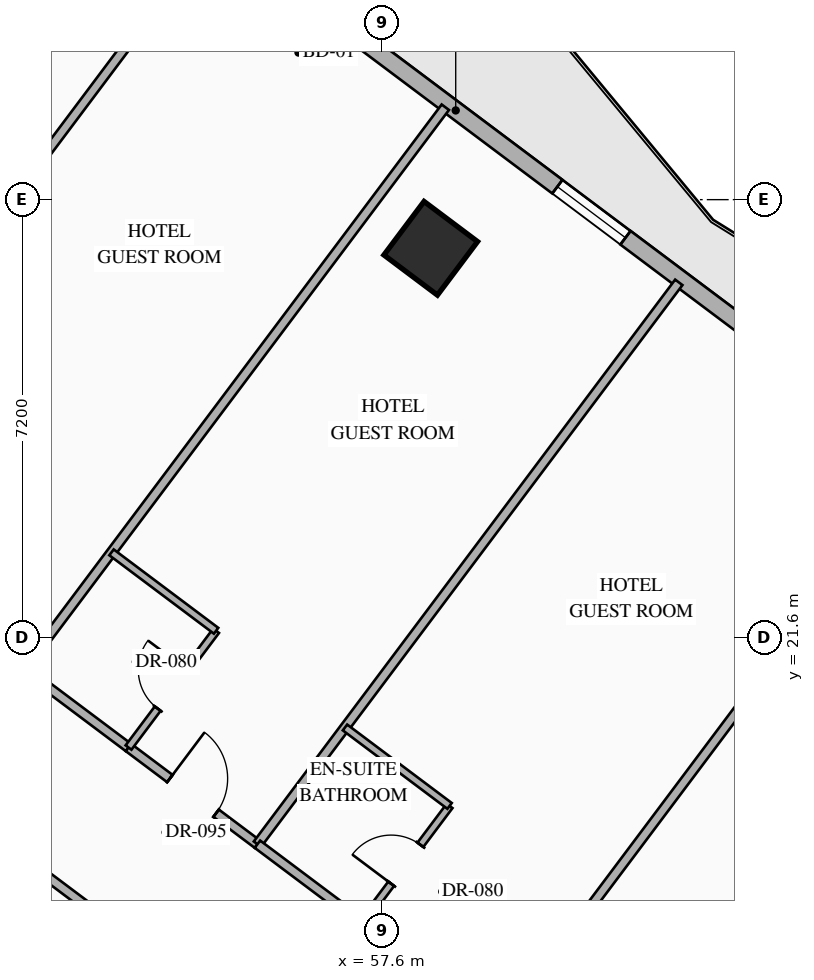
"""IFC4 building model, lengths in metres.
Left out: names, types, materials, properties, quantities, classifications, styles, units other than length and angle.
Written with IfcOpenShell. Run it as: python <this file> out.ifc"""

import sys

from ifc_helpers import new_model, si_unit, direction, frame, frame_2d, origin, origin_2d, place, context, subcontext, project, spatial, rectangle, hollow_rectangle, extrude, element, fill, save


model = new_model("IFC4")
c1 = context("Model", 3, precision=1e-05, world=origin(), true_north=direction((0.0, 1.0)))
c2 = subcontext(c1, "Body", "Model", "MODEL_VIEW")
j1 = project(units=[si_unit("LENGTHUNIT", "METRE"), si_unit("PLANEANGLEUNIT", "RADIAN")], contexts=[c1])
p1 = place(None, origin())
s1 = spatial("IfcSite", under=j1, at=p1, CompositionType="ELEMENT")
p2 = place(p1, origin())
s2 = spatial("IfcBuilding", under=s1, at=p2, CompositionType="ELEMENT")
p3 = place(p2, frame((0.0, 0.0, 56.7)))
s3 = spatial("IfcBuildingStorey", under=s2, at=p3, CompositionType="ELEMENT", Elevation=56.7)
p4 = place(p3, frame((58.4, 28.0, 0.0), z_axis=(0.0, 0.0, 1.0), x_axis=(0.799999996291, -0.600000004945, 0.0)))
e1 = element("IfcColumn", 1, at=p4, inside=s3, PredefinedType="COLUMN", context=c2, shape_type="SweptSolid", body=[
    extrude(hollow_rectangle(XDim=1.1, YDim=1.1, WallThickness=0.04, at=origin_2d()), origin(), (0.0, 0.0, 1.0), 3.35),
])
p5 = place(p3, frame((44.86, 40.73, 0.0), z_axis=(0.0, 0.0, 1.0), x_axis=(0.800006902154, -0.599990797017, 0.0)))
e2 = element("IfcWall", 2, at=p5, inside=s3, PredefinedType="STANDARD", context=c2, shape_type="SweptSolid", body=[
    extrude(rectangle(XDim=29.712, YDim=0.28, at=frame_2d((14.856, 0.0))), origin(), (0.0, 0.0, 1.0), 3.13),
])
p6 = place(p5, frame((14.249, 0.0, 0.0)))
e3 = element("IfcOpeningElement", 3, at=p6, cuts=e2, PredefinedType="OPENING", context=c2, shape_type="SweptSolid", body=[
    extrude(rectangle(XDim=1.1, YDim=2.2, at=frame_2d((0.55, 1.1))), frame((0.0, 0.15, 0.0), z_axis=(0.0, -1.0, 0.0), x_axis=(1.0, 0.0, 0.0)), (0.0, 0.0, 1.0), 0.3),
])
p7 = place(p5, frame((1.612, 0.0, 0.85)))
e4 = element("IfcOpeningElement", 4, at=p7, cuts=e2, PredefinedType="OPENING", context=c2, shape_type="SweptSolid", body=[
    extrude(rectangle(XDim=1.4, YDim=1.8, at=frame_2d((0.7, 0.9))), frame((0.0, 0.15, 0.0), z_axis=(0.0, -1.0, 0.0), x_axis=(1.0, 0.0, 0.0)), (0.0, 0.0, 1.0), 0.3),
])
p8 = place(p5, frame((5.667, 0.0, 0.85)))
e5 = element("IfcOpeningElement", 5, at=p8, cuts=e2, PredefinedType="OPENING", context=c2, shape_type="SweptSolid", body=[
    extrude(rectangle(XDim=1.4, YDim=1.8, at=frame_2d((0.7, 0.9))), frame((0.0, 0.15, 0.0), z_axis=(0.0, -1.0, 0.0), x_axis=(1.0, 0.0, 0.0)), (0.0, 0.0, 1.0), 0.3),
])
p9 = place(p5, frame((9.912, 0.0, 0.85)))
e6 = element("IfcOpeningElement", 6, at=p9, cuts=e2, PredefinedType="OPENING", context=c2, shape_type="SweptSolid", body=[
    extrude(rectangle(XDim=1.4, YDim=1.8, at=frame_2d((0.7, 0.9))), frame((0.0, 0.15, 0.0), z_axis=(0.0, -1.0, 0.0), x_axis=(1.0, 0.0, 0.0)), (0.0, 0.0, 1.0), 0.3),
])
p10 = place(p5, frame((19.528, 0.0, 0.85)))
e7 = element("IfcOpeningElement", 7, at=p10, cuts=e2, PredefinedType="OPENING", context=c2, shape_type="SweptSolid", body=[
    extrude(rectangle(XDim=1.4, YDim=1.8, at=frame_2d((0.7, 0.9))), frame((0.0, 0.15, 0.0), z_axis=(0.0, -1.0, 0.0), x_axis=(1.0, 0.0, 0.0)), (0.0, 0.0, 1.0), 0.3),
])
p11 = place(p5, frame((23.451, 0.0, 0.85)))
e8 = element("IfcOpeningElement", 8, at=p11, cuts=e2, PredefinedType="OPENING", context=c2, shape_type="SweptSolid", body=[
    extrude(rectangle(XDim=1.4, YDim=1.8, at=frame_2d((0.7, 0.9))), frame((0.0, 0.15, 0.0), z_axis=(0.0, -1.0, 0.0), x_axis=(1.0, 0.0, 0.0)), (0.0, 0.0, 1.0), 0.3),
])
p12 = place(p5, frame((27.852, 0.0, 0.85)))
e9 = element("IfcOpeningElement", 9, at=p12, cuts=e2, PredefinedType="OPENING", context=c2, shape_type="SweptSolid", body=[
    extrude(rectangle(XDim=1.4, YDim=1.8, at=frame_2d((0.7, 0.9))), frame((0.0, 0.15, 0.0), z_axis=(0.0, -1.0, 0.0), x_axis=(1.0, 0.0, 0.0)), (0.0, 0.0, 1.0), 0.3),
])
p13 = place(p3, frame((53.318, 2.487, 0.0), z_axis=(0.0, 0.0, 1.0), x_axis=(-0.800004174678, 0.599994433723, 0.0)))
e10 = element("IfcWall", 10, at=p13, inside=s3, PredefinedType="STANDARD", context=c2, shape_type="SweptSolid", body=[
    extrude(rectangle(XDim=35.089, YDim=0.28, at=frame_2d((17.544, 0.0))), origin(), (0.0, 0.0, 1.0), 3.13),
])
p14 = place(p13, frame((1.931, 0.0, 0.85)))
e11 = element("IfcOpeningElement", 11, at=p14, cuts=e10, PredefinedType="OPENING", context=c2, shape_type="SweptSolid", body=[
    extrude(rectangle(XDim=1.4, YDim=1.8, at=frame_2d((0.7, 0.9))), frame((0.0, 0.15, 0.0), z_axis=(0.0, -1.0, 0.0), x_axis=(1.0, 0.0, 0.0)), (0.0, 0.0, 1.0), 0.3),
])
p15 = place(p13, frame((6.819, 0.0, 0.85)))
e12 = element("IfcOpeningElement", 12, at=p15, cuts=e10, PredefinedType="OPENING", context=c2, shape_type="SweptSolid", body=[
    extrude(rectangle(XDim=1.4, YDim=1.8, at=frame_2d((0.7, 0.9))), frame((0.0, 0.15, 0.0), z_axis=(0.0, -1.0, 0.0), x_axis=(1.0, 0.0, 0.0)), (0.0, 0.0, 1.0), 0.3),
])
p16 = place(p13, frame((11.832, 0.0, 0.85)))
e13 = element("IfcOpeningElement", 13, at=p16, cuts=e10, PredefinedType="OPENING", context=c2, shape_type="SweptSolid", body=[
    extrude(rectangle(XDim=1.4, YDim=1.8, at=frame_2d((0.7, 0.9))), frame((0.0, 0.15, 0.0), z_axis=(0.0, -1.0, 0.0), x_axis=(1.0, 0.0, 0.0)), (0.0, 0.0, 1.0), 0.3),
])
p17 = place(p13, frame((17.647, 0.0, 0.85)))
e14 = element("IfcOpeningElement", 14, at=p17, cuts=e10, PredefinedType="OPENING", context=c2, shape_type="SweptSolid", body=[
    extrude(rectangle(XDim=1.4, YDim=1.8, at=frame_2d((0.7, 0.9))), frame((0.0, 0.15, 0.0), z_axis=(0.0, -1.0, 0.0), x_axis=(1.0, 0.0, 0.0)), (0.0, 0.0, 1.0), 0.3),
])
p18 = place(p13, frame((21.857, 0.0, 0.85)))
e15 = element("IfcOpeningElement", 15, at=p18, cuts=e10, PredefinedType="OPENING", context=c2, shape_type="SweptSolid", body=[
    extrude(rectangle(XDim=1.4, YDim=1.8, at=frame_2d((0.7, 0.9))), frame((0.0, 0.15, 0.0), z_axis=(0.0, -1.0, 0.0), x_axis=(1.0, 0.0, 0.0)), (0.0, 0.0, 1.0), 0.3),
])
p19 = place(p13, frame((26.87, 0.0, 0.85)))
e16 = element("IfcOpeningElement", 16, at=p19, cuts=e10, PredefinedType="OPENING", context=c2, shape_type="SweptSolid", body=[
    extrude(rectangle(XDim=1.4, YDim=1.8, at=frame_2d((0.7, 0.9))), frame((0.0, 0.15, 0.0), z_axis=(0.0, -1.0, 0.0), x_axis=(1.0, 0.0, 0.0)), (0.0, 0.0, 1.0), 0.3),
])
p20 = place(p13, frame((31.757, 0.0, 0.85)))
e17 = element("IfcOpeningElement", 17, at=p20, cuts=e10, PredefinedType="OPENING", context=c2, shape_type="SweptSolid", body=[
    extrude(rectangle(XDim=1.4, YDim=1.8, at=frame_2d((0.7, 0.9))), frame((0.0, 0.15, 0.0), z_axis=(0.0, -1.0, 0.0), x_axis=(1.0, 0.0, 0.0)), (0.0, 0.0, 1.0), 0.3),
])
for number, where, z_axis, x_axis in (
    (18, (47.87, 23.96, 0.0), (0.0, 0.0, 1.0), (0.6, 0.8, 0.0)),
    (19, (51.71, 21.08, 0.0), (0.0, 0.0, 1.0), (0.6, 0.8, 0.0)),
):
    element("IfcWall", number, at=place(p3, frame(where, z_axis=z_axis, x_axis=x_axis)), inside=s3, PredefinedType="PARTITIONING", context=c2, shape_type="SweptSolid", body=[
        extrude(rectangle(XDim=11.55, YDim=0.15, at=frame_2d((5.775, 0.0))), origin(), (0.0, 0.0, 1.0), 3.13),
    ])
p21 = place(p3, frame((51.71, 21.08, 0.0), z_axis=(0.0, 0.0, 1.0), x_axis=(0.79998637334, -0.60001816845, 0.0)))
e20 = element("IfcWall", 20, at=p21, inside=s3, PredefinedType="PARTITIONING", context=c2, shape_type="SweptSolid", body=[
    extrude(rectangle(XDim=2.15, YDim=0.15, at=frame_2d((1.075, 0.0))), origin(), (0.0, 0.0, 1.0), 2.775),
])
p22 = place(p3, frame((53.43, 19.79, 0.0), z_axis=(0.0, 0.0, 1.0), x_axis=(0.8, -0.6, 0.0)))
e21 = element("IfcWall", 21, at=p22, inside=s3, PredefinedType="PARTITIONING", context=c2, shape_type="SweptSolid", body=[
    extrude(rectangle(XDim=2.65, YDim=0.15, at=frame_2d((1.325, 0.0))), origin(), (0.0, 0.0, 1.0), 2.775),
])
p23 = place(p22, frame((0.85, 0.0, 0.0)))
e22 = element("IfcOpeningElement", 22, at=p23, cuts=e21, PredefinedType="OPENING", context=c2, shape_type="SweptSolid", body=[
    extrude(rectangle(XDim=0.95, YDim=2.15, at=frame_2d((0.475, 1.075))), frame((0.0, 0.085, 0.0), z_axis=(0.0, -1.0, 0.0), x_axis=(1.0, 0.0, 0.0)), (0.0, 0.0, 1.0), 0.17),
])
p24 = place(p3, frame((53.43, 19.79, 0.0), z_axis=(0.0, 0.0, 1.0), x_axis=(0.600065100855, 0.79995117022, 0.0)))
e23 = element("IfcWall", 23, at=p24, inside=s3, PredefinedType="PARTITIONING", context=c2, shape_type="SweptSolid", body=[
    extrude(rectangle(XDim=2.4, YDim=0.12, at=frame_2d((1.2, 0.0))), origin(), (0.0, 0.0, 1.0), 3.13),
])
p25 = place(p24, frame((0.8, 0.0, 0.0)))
e24 = element("IfcOpeningElement", 24, at=p25, cuts=e23, PredefinedType="OPENING", context=c2, shape_type="SweptSolid", body=[
    extrude(rectangle(XDim=0.8, YDim=2.06, at=frame_2d((0.4, 1.03))), frame((0.0, 0.07, 0.0), z_axis=(0.0, -1.0, 0.0), x_axis=(1.0, 0.0, 0.0)), (0.0, 0.0, 1.0), 0.14),
])
p26 = place(p3, frame((53.15, 23.0, 0.0), z_axis=(0.0, 0.0, 1.0), x_axis=(0.800027249606, -0.599963665473, 0.0)))
e25 = element("IfcWall", 25, at=p26, inside=s3, PredefinedType="PARTITIONING", context=c2, shape_type="SweptSolid", body=[
    extrude(rectangle(XDim=2.15, YDim=0.12, at=frame_2d((1.075, 0.0))), origin(), (0.0, 0.0, 1.0), 3.13),
])
p27 = place(p3, frame((55.55, 18.2, 0.0), z_axis=(0.0, 0.0, 1.0), x_axis=(0.599996617946, 0.80000253653, 0.0)))
e26 = element("IfcWall", 26, at=p27, inside=s3, PredefinedType="PARTITIONING", context=c2, shape_type="SweptSolid", body=[
    extrude(rectangle(XDim=11.55, YDim=0.15, at=frame_2d((5.775, 0.0))), origin(), (0.0, 0.0, 1.0), 3.13),
])
p28 = place(p3, frame((55.55, 18.2, 0.0), z_axis=(0.0, 0.0, 1.0), x_axis=(0.79998637334, -0.60001816845, 0.0)))
e27 = element("IfcWall", 27, at=p28, inside=s3, PredefinedType="PARTITIONING", context=c2, shape_type="SweptSolid", body=[
    extrude(rectangle(XDim=2.15, YDim=0.15, at=frame_2d((1.075, 0.0))), origin(), (0.0, 0.0, 1.0), 2.775),
])
p29 = place(p3, frame((57.27, 16.91, 0.0), z_axis=(0.0, 0.0, 1.0), x_axis=(0.599951172744, 0.800036618114, 0.0)))
e28 = element("IfcWall", 28, at=p29, inside=s3, PredefinedType="PARTITIONING", context=c2, shape_type="SweptSolid", body=[
    extrude(rectangle(XDim=2.4, YDim=0.12, at=frame_2d((1.2, 0.0))), origin(), (0.0, 0.0, 1.0), 3.13),
])
p30 = place(p29, frame((0.8, 0.0, 0.0)))
e29 = element("IfcOpeningElement", 29, at=p30, cuts=e28, PredefinedType="OPENING", context=c2, shape_type="SweptSolid", body=[
    extrude(rectangle(XDim=0.8, YDim=2.06, at=frame_2d((0.4, 1.03))), frame((0.0, 0.07, 0.0), z_axis=(0.0, -1.0, 0.0), x_axis=(1.0, 0.0, 0.0)), (0.0, 0.0, 1.0), 0.14),
])
p31 = place(p3, frame((56.99, 20.12, 0.0), z_axis=(0.0, 0.0, 1.0), x_axis=(0.79998637334, -0.60001816845, 0.0)))
e30 = element("IfcWall", 30, at=p31, inside=s3, PredefinedType="PARTITIONING", context=c2, shape_type="SweptSolid", body=[
    extrude(rectangle(XDim=2.15, YDim=0.12, at=frame_2d((1.075, 0.0))), origin(), (0.0, 0.0, 1.0), 3.13),
])
p32 = place(p3, frame((59.55, 15.2, 0.0), z_axis=(0.0, 0.0, 1.0), x_axis=(0.599996617946, 0.80000253653, 0.0)))
e31 = element("IfcWall", 31, at=p32, inside=s3, PredefinedType="PARTITIONING", context=c2, shape_type="SweptSolid", body=[
    extrude(rectangle(XDim=11.55, YDim=0.15, at=frame_2d((5.775, 0.0))), origin(), (0.0, 0.0, 1.0), 3.13),
])
p33 = place(p3, frame((51.17, 18.36, 0.0), z_axis=(0.0, 0.0, 1.0), x_axis=(0.79998637334, -0.60001816845, 0.0)))
e32 = element("IfcWall", 32, at=p33, inside=s3, PredefinedType="PARTITIONING", context=c2, shape_type="SweptSolid", body=[
    extrude(rectangle(XDim=2.15, YDim=0.15, at=frame_2d((1.075, 0.0))), origin(), (0.0, 0.0, 1.0), 2.425),
])
p34 = place(p10, origin())
e33 = element("IfcWindow", 33, at=p34, inside=s3, PartitioningType="SINGLE_PANEL", PredefinedType="WINDOW", context=c2, shape_type="SweptSolid", body=[
    extrude(rectangle(XDim=1.4, YDim=1.8, at=frame_2d((0.7, 0.9))), frame((0.0, 0.03, 0.0), z_axis=(0.0, -1.0, 0.0), x_axis=(1.0, 0.0, 0.0)), (0.0, 0.0, 1.0), 0.06),
])
fill(e7, e33)
p35 = place(p23, origin())
e34 = element("IfcDoor", 34, at=p35, inside=s3, OperationType="SINGLE_SWING_LEFT", PredefinedType="DOOR", context=c2, shape_type="SweptSolid", body=[
    extrude(rectangle(XDim=0.95, YDim=2.15, at=frame_2d((0.475, 1.075))), frame((0.0, 0.025, 0.0), z_axis=(0.0, -1.0, 0.0), x_axis=(1.0, 0.0, 0.0)), (0.0, 0.0, 1.0), 0.05),
])
fill(e22, e34)
p36 = place(p25, origin())
e35 = element("IfcDoor", 35, at=p36, inside=s3, OperationType="SINGLE_SWING_RIGHT", PredefinedType="DOOR", context=c2, shape_type="SweptSolid", body=[
    extrude(rectangle(XDim=0.8, YDim=2.06, at=frame_2d((0.4, 1.03))), frame((0.0, 0.025, 0.0), z_axis=(0.0, -1.0, 0.0), x_axis=(1.0, 0.0, 0.0)), (0.0, 0.0, 1.0), 0.05),
])
fill(e24, e35)
p37 = place(p30, origin())
e36 = element("IfcDoor", 36, at=p37, inside=s3, OperationType="SINGLE_SWING_LEFT", PredefinedType="DOOR", context=c2, shape_type="SweptSolid", body=[
    extrude(rectangle(XDim=0.8, YDim=2.06, at=frame_2d((0.4, 1.03))), frame((0.0, 0.025, 0.0), z_axis=(0.0, -1.0, 0.0), x_axis=(1.0, 0.0, 0.0)), (0.0, 0.0, 1.0), 0.05),
])
fill(e29, e36)
save(model, sys.argv[1])
